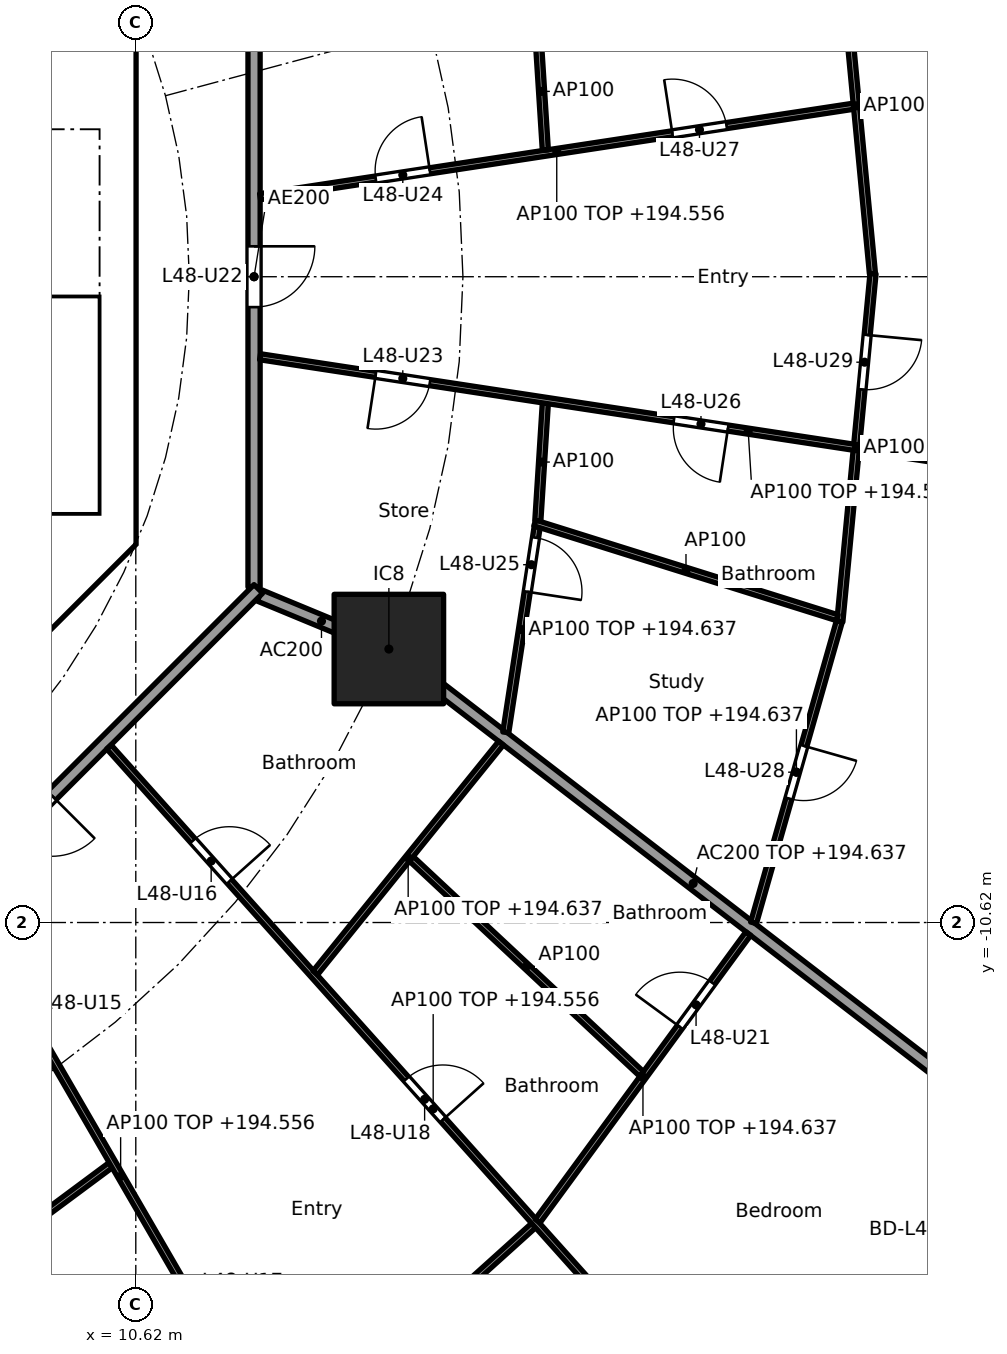
"""IFC4 building model, lengths in metres.
Left out: names, types, materials, properties, quantities, classifications, styles, units other than length and angle.
Written with IfcOpenShell. Run it as: python <this file> out.ifc"""

import sys

from ifc_helpers import new_model, si_unit, direction, frame, frame_2d, origin, origin_2d, place, context, subcontext, project, spatial, polyline, rectangle, outline, extrude, element, fill, save


model = new_model("IFC4")
c1 = context("Model", 3, precision=1e-05, world=origin(), true_north=direction((0.0, 1.0)))
c2 = subcontext(c1, "Body", "Model", "MODEL_VIEW")
j1 = project(units=[si_unit("LENGTHUNIT", "METRE"), si_unit("PLANEANGLEUNIT", "RADIAN")], contexts=[c1])
p1 = place(None, origin())
s1 = spatial("IfcSite", under=j1, at=p1, CompositionType="ELEMENT")
p2 = place(p1, origin())
s2 = spatial("IfcBuilding", under=s1, at=p2, CompositionType="ELEMENT")
p3 = place(p2, frame((0.0, 0.0, 191.8)))
s3 = spatial("IfcBuildingStorey", under=s2, at=p3, CompositionType="ELEMENT", Elevation=191.8)
p4 = place(p3, frame((14.782, -6.123, 0.0), z_axis=(0.0, 0.0, 1.0), x_axis=(1.0, 0.0, 0.0)))
e1 = element("IfcColumn", 1, at=p4, inside=s3, PredefinedType="COLUMN", context=c2, shape_type="SweptSolid", body=[
    extrude(rectangle(XDim=1.8, YDim=1.8, at=origin_2d()), origin(), (0.0, 0.0, 1.0), 3.7),
])
p5 = place(p3, frame((25.189, -14.848, 0.0), z_axis=(0.0, 0.0, 1.0), x_axis=(-0.506367803691, -0.862317602386, 0.0)))
e2 = element("IfcWall", 2, at=p5, inside=s3, PredefinedType="SOLIDWALL", context=c2, shape_type="SweptSolid", body=[
    extrude(rectangle(XDim=3.092, YDim=0.25, at=frame_2d((1.546, 0.0))), origin(), (0.0, 0.0, 1.0), 3.44),
])
p6 = place(p5, frame((0.496, 0.0, 0.0)))
e3 = element("IfcOpeningElement", 3, at=p6, cuts=e2, PredefinedType="OPENING", context=c2, shape_type="SweptSolid", body=[
    extrude(rectangle(XDim=2.1, YDim=2.4, at=frame_2d((1.05, 1.2))), frame((0.0, 0.135, 0.0), z_axis=(0.0, -1.0, 0.0), x_axis=(1.0, 0.0, 0.0)), (0.0, 0.0, 1.0), 0.27),
])
p7 = place(p3, frame((4.613, -9.988, 0.0), z_axis=(0.0, 0.0, 1.0), x_axis=(0.707106781187, 0.707106781187, 0.0)))
e4 = element("IfcWall", 4, at=p7, inside=s3, PredefinedType="SHEAR", context=c2, shape_type="SweptSolid", body=[
    extrude(rectangle(XDim=7.602, YDim=0.6, at=frame_2d((3.801, 0.0))), origin(), (0.0, 0.0, 1.0), 3.44),
])
p8 = place(p7, frame((3.201, 0.0, 0.0)))
e5 = element("IfcOpeningElement", 5, at=p8, cuts=e4, PredefinedType="OPENING", context=c2, shape_type="SweptSolid", body=[
    extrude(rectangle(XDim=1.2, YDim=2.1, at=frame_2d((0.6, 1.05))), frame((0.0, 0.31, 0.0), z_axis=(0.0, -1.0, 0.0), x_axis=(1.0, 0.0, 0.0)), (0.0, 0.0, 1.0), 0.62),
])
p9 = place(p3, origin())
e6 = element("IfcWall", 6, at=p9, inside=s3, PredefinedType="SHEAR", context=c2, shape_type="SweptSolid", body=[
    extrude(outline(polyline([(9.776, -4.401), (10.025, -4.152), (10.025, -3.801), (10.025, 4.152), (9.776, 4.401), (10.2, 4.825), (10.625, 4.401), (10.625, -4.401), (10.2, -4.825), (9.776, -4.401)])), origin(), (0.0, 0.0, 1.0), 3.44),
])
p10 = place(p3, origin())
e7 = element("IfcWall", 7, at=p10, inside=s3, PredefinedType="SOLIDWALL", context=c2, shape_type="SweptSolid", body=[
    extrude(outline(polyline([(10.025, -4.1), (6.7, -4.1), (6.7, -3.9), (10.025, -3.9), (10.025, -4.1)])), origin(), (0.0, 0.0, 1.0), 3.44),
])
p11 = place(p3, frame((6.138, -14.83, 0.0), z_axis=(0.0, 0.0, 1.0), x_axis=(0.294818517221, -0.955553264818, 0.0)))
e8 = element("IfcWall", 8, at=p11, inside=s3, PredefinedType="PARTITIONING", context=c2, shape_type="SweptSolid", body=[
    extrude(rectangle(XDim=12.619, YDim=0.2, at=frame_2d((6.31, 0.0))), origin(), (0.0, 0.0, 1.0), 2.837),
])
p12 = place(p3, frame((12.657, -5.243, 0.0), z_axis=(0.0, 0.0, 1.0), x_axis=(0.92383017907, -0.382802560388, 0.0)))
e9 = element("IfcWall", 9, at=p12, inside=s3, PredefinedType="PARTITIONING", context=c2, shape_type="SweptSolid", body=[
    extrude(rectangle(XDim=2.2, YDim=0.2, at=frame_2d((1.1, 0.0))), origin(), (0.0, 0.0, 1.0), 3.44),
])
p13 = place(p3, frame((14.822, -6.154, 0.0), z_axis=(0.0, 0.0, 1.0), x_axis=(0.792203056092, -0.610257583254, 0.0)))
e10 = element("IfcWall", 10, at=p13, inside=s3, PredefinedType="PARTITIONING", context=c2, shape_type="SweptSolid", body=[
    extrude(rectangle(XDim=12.533, YDim=0.2, at=frame_2d((6.266, 0.0))), origin(), (0.0, 0.0, 1.0), 2.837),
])
p14 = place(p3, frame((12.565, -5.104, 0.0), z_axis=(0.0, 0.0, 1.0), x_axis=(0.0, 1.0, 0.0)))
e11 = element("IfcWall", 11, at=p14, inside=s3, PredefinedType="PARTITIONING", context=c2, shape_type="SweptSolid", body=[
    extrude(rectangle(XDim=10.209, YDim=0.2, at=frame_2d((5.104, 0.0))), origin(), (0.0, 0.0, 1.0), 3.44),
])
p15 = place(p14, frame((4.604, 0.0, 0.0)))
e12 = element("IfcOpeningElement", 12, at=p15, cuts=e11, PredefinedType="OPENING", context=c2, shape_type="SweptSolid", body=[
    extrude(rectangle(XDim=1.0, YDim=2.1, at=frame_2d((0.5, 1.05))), frame((0.0, 0.11, 0.0), z_axis=(0.0, -1.0, 0.0), x_axis=(1.0, 0.0, 0.0)), (0.0, 0.0, 1.0), 0.22),
])
p16 = place(p3, frame((5.275, -12.494, 0.0), z_axis=(0.0, 0.0, 1.0), x_axis=(0.707106781187, 0.707106781187, 0.0)))
e13 = element("IfcWall", 13, at=p16, inside=s3, PredefinedType="PARTITIONING", context=c2, shape_type="SweptSolid", body=[
    extrude(rectangle(XDim=10.409, YDim=0.2, at=frame_2d((5.205, 0.0))), origin(), (0.0, 0.0, 1.0), 3.44),
])
p17 = place(p16, frame((4.604, 0.0, 0.0)))
e14 = element("IfcOpeningElement", 14, at=p17, cuts=e13, PredefinedType="OPENING", context=c2, shape_type="SweptSolid", body=[
    extrude(rectangle(XDim=1.0, YDim=2.1, at=frame_2d((0.5, 1.05))), frame((0.0, 0.11, 0.0), z_axis=(0.0, -1.0, 0.0), x_axis=(1.0, 0.0, 0.0)), (0.0, 0.0, 1.0), 0.22),
])
p18 = place(p3, frame((22.734, 0.05, 0.0), z_axis=(0.0, 0.0, 1.0), x_axis=(-0.094923312677, 0.995484587882, 0.0)))
e15 = element("IfcWall", 15, at=p18, inside=s3, PredefinedType="PARTITIONING", context=c2, shape_type="SweptSolid", body=[
    extrude(rectangle(XDim=5.548, YDim=0.1, at=frame_2d((2.774, 0.0))), origin(), (0.0, 0.0, 1.0), 2.837),
])
p19 = place(p3, frame((22.744, 0.05, 0.0), z_axis=(0.0, 0.0, 1.0), x_axis=(-0.094931362305, -0.995483820286, 0.0)))
e16 = element("IfcWall", 16, at=p19, inside=s3, PredefinedType="PARTITIONING", context=c2, shape_type="SweptSolid", body=[
    extrude(rectangle(XDim=5.748, YDim=0.1, at=frame_2d((2.874, 0.0))), origin(), (0.0, 0.0, 1.0), 2.837),
])
p20 = place(p19, frame((1.012, 0.0, 0.0)))
e17 = element("IfcOpeningElement", 17, at=p20, cuts=e16, PredefinedType="OPENING", context=c2, shape_type="SweptSolid", body=[
    extrude(rectangle(XDim=0.9, YDim=2.1, at=frame_2d((0.45, 1.05))), frame((0.0, 0.06, 0.0), z_axis=(0.0, -1.0, 0.0), x_axis=(1.0, 0.0, 0.0)), (0.0, 0.0, 1.0), 0.12),
])
p21 = place(p3, frame((12.664, 1.316, 0.0), z_axis=(0.0, 0.0, 1.0), x_axis=(0.988579217853, 0.150702123505, 0.0)))
e18 = element("IfcWall", 18, at=p21, inside=s3, PredefinedType="PARTITIONING", context=c2, shape_type="SweptSolid", body=[
    extrude(rectangle(XDim=9.871, YDim=0.1, at=frame_2d((4.936, 0.0))), origin(), (0.0, 0.0, 1.0), 2.756),
])
p22 = place(p21, frame((1.924, 0.0, 0.0)))
e19 = element("IfcOpeningElement", 19, at=p22, cuts=e18, PredefinedType="OPENING", context=c2, shape_type="SweptSolid", body=[
    extrude(rectangle(XDim=0.9, YDim=2.1, at=frame_2d((0.45, 1.05))), frame((0.0, 0.06, 0.0), z_axis=(0.0, -1.0, 0.0), x_axis=(1.0, 0.0, 0.0)), (0.0, 0.0, 1.0), 0.12),
])
p23 = place(p21, frame((6.86, 0.0, 0.0)))
e20 = element("IfcOpeningElement", 20, at=p23, cuts=e18, PredefinedType="OPENING", context=c2, shape_type="SweptSolid", body=[
    extrude(rectangle(XDim=0.9, YDim=2.1, at=frame_2d((0.45, 1.05))), frame((0.0, 0.06, 0.0), z_axis=(0.0, -1.0, 0.0), x_axis=(1.0, 0.0, 0.0)), (0.0, 0.0, 1.0), 0.12),
])
p24 = place(p3, frame((17.355, 2.082, 0.0), z_axis=(0.0, 0.0, 1.0), x_axis=(-0.063689464349, 0.997969765139, 0.0)))
e21 = element("IfcWall", 21, at=p24, inside=s3, PredefinedType="PARTITIONING", context=c2, shape_type="SweptSolid", body=[
    extrude(rectangle(XDim=1.936, YDim=0.1, at=frame_2d((0.968, 0.0))), origin(), (0.0, 0.0, 1.0), 3.44),
])
p25 = place(p3, frame((6.921, -17.05, 0.0), z_axis=(0.0, 0.0, 1.0), x_axis=(0.802769141821, 0.596289950394, 0.0)))
e22 = element("IfcWall", 22, at=p25, inside=s3, PredefinedType="PARTITIONING", context=c2, shape_type="SweptSolid", body=[
    extrude(rectangle(XDim=4.092, YDim=0.1, at=frame_2d((2.046, 0.0))), origin(), (0.0, 0.0, 1.0), 2.837),
])
p26 = place(p3, frame((7.708, -10.198, 0.0), z_axis=(0.0, 0.0, 1.0), x_axis=(0.501288100085, -0.865280440501, 0.0)))
e23 = element("IfcWall", 23, at=p26, inside=s3, PredefinedType="PARTITIONING", context=c2, shape_type="SweptSolid", body=[
    extrude(rectangle(XDim=10.623, YDim=0.1, at=frame_2d((5.312, 0.0))), origin(), (0.0, 0.0, 1.0), 2.756),
])
p27 = place(p26, frame((2.082, 0.0, 0.0)))
e24 = element("IfcOpeningElement", 24, at=p27, cuts=e23, PredefinedType="OPENING", context=c2, shape_type="SweptSolid", body=[
    extrude(rectangle(XDim=0.9, YDim=2.1, at=frame_2d((0.45, 1.05))), frame((0.0, 0.06, 0.0), z_axis=(0.0, -1.0, 0.0), x_axis=(1.0, 0.0, 0.0)), (0.0, 0.0, 1.0), 0.12),
])
p28 = place(p26, frame((7.369, 0.0, 0.0)))
e25 = element("IfcOpeningElement", 25, at=p28, cuts=e23, PredefinedType="OPENING", context=c2, shape_type="SweptSolid", body=[
    extrude(rectangle(XDim=0.9, YDim=2.1, at=frame_2d((0.45, 1.05))), frame((0.0, 0.06, 0.0), z_axis=(0.0, -1.0, 0.0), x_axis=(1.0, 0.0, 0.0)), (0.0, 0.0, 1.0), 0.12),
])
p29 = place(p3, frame((13.045, -19.313, 0.0), z_axis=(0.0, 0.0, 1.0), x_axis=(0.742790086539, 0.66952437397, 0.0)))
e26 = element("IfcWall", 26, at=p29, inside=s3, PredefinedType="PARTITIONING", context=c2, shape_type="SweptSolid", body=[
    extrude(rectangle(XDim=5.542, YDim=0.1, at=frame_2d((2.771, 0.0))), origin(), (0.0, 0.0, 1.0), 2.837),
])
p30 = place(p29, frame((2.321, 0.0, 0.0)))
e27 = element("IfcOpeningElement", 27, at=p30, cuts=e26, PredefinedType="OPENING", context=c2, shape_type="SweptSolid", body=[
    extrude(rectangle(XDim=0.9, YDim=2.1, at=frame_2d((0.45, 1.05))), frame((0.0, 0.06, 0.0), z_axis=(0.0, -1.0, 0.0), x_axis=(1.0, 0.0, 0.0)), (0.0, 0.0, 1.0), 0.12),
])
p31 = place(p3, frame((10.178, -7.732, 0.0), z_axis=(0.0, 0.0, 1.0), x_axis=(0.667283629999, -0.74480370376, 0.0)))
e28 = element("IfcWall", 28, at=p31, inside=s3, PredefinedType="PARTITIONING", context=c2, shape_type="SweptSolid", body=[
    extrude(rectangle(XDim=15.983, YDim=0.1, at=frame_2d((7.992, 0.0))), origin(), (0.0, 0.0, 1.0), 2.756),
])
p32 = place(p31, frame((2.07, 0.0, 0.0)))
e29 = element("IfcOpeningElement", 29, at=p32, cuts=e28, PredefinedType="OPENING", context=c2, shape_type="SweptSolid", body=[
    extrude(rectangle(XDim=0.9, YDim=2.1, at=frame_2d((0.45, 1.05))), frame((0.0, 0.06, 0.0), z_axis=(0.0, -1.0, 0.0), x_axis=(1.0, 0.0, 0.0)), (0.0, 0.0, 1.0), 0.12),
])
p33 = place(p31, frame((7.331, 0.0, 0.0)))
e30 = element("IfcOpeningElement", 30, at=p33, cuts=e28, PredefinedType="OPENING", context=c2, shape_type="SweptSolid", body=[
    extrude(rectangle(XDim=0.9, YDim=2.1, at=frame_2d((0.45, 1.05))), frame((0.0, 0.06, 0.0), z_axis=(0.0, -1.0, 0.0), x_axis=(1.0, 0.0, 0.0)), (0.0, 0.0, 1.0), 0.12),
])
p34 = place(p31, frame((12.802, 0.0, 0.0)))
e31 = element("IfcOpeningElement", 31, at=p34, cuts=e28, PredefinedType="OPENING", context=c2, shape_type="SweptSolid", body=[
    extrude(rectangle(XDim=0.9, YDim=2.1, at=frame_2d((0.45, 1.05))), frame((0.0, 0.06, 0.0), z_axis=(0.0, -1.0, 0.0), x_axis=(1.0, 0.0, 0.0)), (0.0, 0.0, 1.0), 0.12),
])
p35 = place(p3, frame((13.572, -11.447, 0.0), z_axis=(0.0, 0.0, 1.0), x_axis=(0.628738316533, 0.777616955399, 0.0)))
e32 = element("IfcWall", 32, at=p35, inside=s3, PredefinedType="PARTITIONING", context=c2, shape_type="SweptSolid", body=[
    extrude(rectangle(XDim=4.857, YDim=0.1, at=frame_2d((2.429, 0.0))), origin(), (0.0, 0.0, 1.0), 2.837),
])
p36 = place(p3, frame((17.229, -15.529, 0.0), z_axis=(0.0, 0.0, 1.0), x_axis=(0.591110768293, 0.806590391468, 0.0)))
e33 = element("IfcWall", 33, at=p36, inside=s3, PredefinedType="PARTITIONING", context=c2, shape_type="SweptSolid", body=[
    extrude(rectangle(XDim=5.86, YDim=0.1, at=frame_2d((2.93, 0.0))), origin(), (0.0, 0.0, 1.0), 2.837),
])
p37 = place(p36, frame((3.958, 0.0, 0.0)))
e34 = element("IfcOpeningElement", 34, at=p37, cuts=e33, PredefinedType="OPENING", context=c2, shape_type="SweptSolid", body=[
    extrude(rectangle(XDim=0.9, YDim=2.1, at=frame_2d((0.45, 1.05))), frame((0.0, 0.06, 0.0), z_axis=(0.0, -1.0, 0.0), x_axis=(1.0, 0.0, 0.0)), (0.0, 0.0, 1.0), 0.12),
])
p38 = place(p3, frame((15.152, -9.573, 0.0), z_axis=(0.0, 0.0, 1.0), x_axis=(0.730723083214, -0.682673989294, 0.0)))
e35 = element("IfcWall", 35, at=p38, inside=s3, PredefinedType="PARTITIONING", context=c2, shape_type="SweptSolid", body=[
    extrude(rectangle(XDim=5.183, YDim=0.1, at=frame_2d((2.591, 0.0))), origin(), (0.0, 0.0, 1.0), 3.44),
])
p39 = place(p3, frame((16.704, -7.493, 0.0), z_axis=(0.0, 0.0, 1.0), x_axis=(0.1510806336, 0.988521442434, 0.0)))
e36 = element("IfcWall", 36, at=p39, inside=s3, PredefinedType="PARTITIONING", context=c2, shape_type="SweptSolid", body=[
    extrude(rectangle(XDim=3.419, YDim=0.1, at=frame_2d((1.71, 0.0))), origin(), (0.0, 0.0, 1.0), 2.837),
])
p40 = place(p39, frame((2.339, 0.0, 0.0)))
e37 = element("IfcOpeningElement", 37, at=p40, cuts=e36, PredefinedType="OPENING", context=c2, shape_type="SweptSolid", body=[
    extrude(rectangle(XDim=0.9, YDim=2.1, at=frame_2d((0.45, 1.05))), frame((0.0, 0.06, 0.0), z_axis=(0.0, -1.0, 0.0), x_axis=(1.0, 0.0, 0.0)), (0.0, 0.0, 1.0), 0.12),
])
p41 = place(p3, frame((20.779, -10.625, 0.0), z_axis=(0.0, 0.0, 1.0), x_axis=(0.273819702124, 0.961781040949, 0.0)))
e38 = element("IfcWall", 38, at=p41, inside=s3, PredefinedType="PARTITIONING", context=c2, shape_type="SweptSolid", body=[
    extrude(rectangle(XDim=5.152, YDim=0.1, at=frame_2d((2.576, 0.0))), origin(), (0.0, 0.0, 1.0), 2.837),
])
p42 = place(p41, frame((2.126, 0.0, 0.0)))
e39 = element("IfcOpeningElement", 39, at=p42, cuts=e38, PredefinedType="OPENING", context=c2, shape_type="SweptSolid", body=[
    extrude(rectangle(XDim=0.9, YDim=2.1, at=frame_2d((0.45, 1.05))), frame((0.0, 0.06, 0.0), z_axis=(0.0, -1.0, 0.0), x_axis=(1.0, 0.0, 0.0)), (0.0, 0.0, 1.0), 0.12),
])
p43 = place(p3, frame((17.181, -4.049, 0.0), z_axis=(0.0, 0.0, 1.0), x_axis=(0.954246359918, -0.299021545351, 0.0)))
e40 = element("IfcWall", 40, at=p43, inside=s3, PredefinedType="PARTITIONING", context=c2, shape_type="SweptSolid", body=[
    extrude(rectangle(XDim=5.213, YDim=0.1, at=frame_2d((2.606, 0.0))), origin(), (0.0, 0.0, 1.0), 3.44),
])
p44 = place(p3, frame((17.232, -4.014, 0.0), z_axis=(0.0, 0.0, 1.0), x_axis=(0.063689464349, 0.997969765139, 0.0)))
e41 = element("IfcWall", 41, at=p44, inside=s3, PredefinedType="PARTITIONING", context=c2, shape_type="SweptSolid", body=[
    extrude(rectangle(XDim=1.936, YDim=0.1, at=frame_2d((0.968, 0.0))), origin(), (0.0, 0.0, 1.0), 3.44),
])
p45 = place(p3, frame((12.664, -1.316, 0.0), z_axis=(0.0, 0.0, 1.0), x_axis=(0.988585177081, -0.150663026836, 0.0)))
e42 = element("IfcWall", 42, at=p45, inside=s3, PredefinedType="PARTITIONING", context=c2, shape_type="SweptSolid", body=[
    extrude(rectangle(XDim=16.24, YDim=0.1, at=frame_2d((8.12, 0.0))), origin(), (0.0, 0.0, 1.0), 2.756),
])
p46 = place(p45, frame((1.924, 0.0, 0.0)))
e43 = element("IfcOpeningElement", 43, at=p46, cuts=e42, PredefinedType="OPENING", context=c2, shape_type="SweptSolid", body=[
    extrude(rectangle(XDim=0.9, YDim=2.1, at=frame_2d((0.45, 1.05))), frame((0.0, 0.06, 0.0), z_axis=(0.0, -1.0, 0.0), x_axis=(1.0, 0.0, 0.0)), (0.0, 0.0, 1.0), 0.12),
])
p47 = place(p45, frame((6.885, 0.0, 0.0)))
e44 = element("IfcOpeningElement", 44, at=p47, cuts=e42, PredefinedType="OPENING", context=c2, shape_type="SweptSolid", body=[
    extrude(rectangle(XDim=0.9, YDim=2.1, at=frame_2d((0.45, 1.05))), frame((0.0, 0.06, 0.0), z_axis=(0.0, -1.0, 0.0), x_axis=(1.0, 0.0, 0.0)), (0.0, 0.0, 1.0), 0.12),
])
p48 = place(p17, frame((1.0, 0.0, 0.0), x_axis=(-1.0, 0.0, 0.0)))
e45 = element("IfcDoor", 45, at=p48, inside=s3, OperationType="SINGLE_SWING_LEFT", PredefinedType="DOOR", context=c2, shape_type="SweptSolid", body=[
    extrude(rectangle(XDim=1.0, YDim=2.1, at=frame_2d((0.5, 1.05))), frame((0.0, 0.025, 0.0), z_axis=(0.0, -1.0, 0.0), x_axis=(1.0, 0.0, 0.0)), (0.0, 0.0, 1.0), 0.05),
])
fill(e14, e45)
p49 = place(p32, origin())
e46 = element("IfcDoor", 46, at=p49, inside=s3, OperationType="SINGLE_SWING_RIGHT", PredefinedType="DOOR", context=c2, shape_type="SweptSolid", body=[
    extrude(rectangle(XDim=0.9, YDim=2.1, at=frame_2d((0.45, 1.05))), frame((0.0, 0.025, 0.0), z_axis=(0.0, -1.0, 0.0), x_axis=(1.0, 0.0, 0.0)), (0.0, 0.0, 1.0), 0.05),
])
fill(e29, e46)
p50 = place(p33, origin())
e47 = element("IfcDoor", 47, at=p50, inside=s3, OperationType="SINGLE_SWING_RIGHT", PredefinedType="DOOR", context=c2, shape_type="SweptSolid", body=[
    extrude(rectangle(XDim=0.9, YDim=2.1, at=frame_2d((0.45, 1.05))), frame((0.0, 0.025, 0.0), z_axis=(0.0, -1.0, 0.0), x_axis=(1.0, 0.0, 0.0)), (0.0, 0.0, 1.0), 0.05),
])
fill(e30, e47)
p51 = place(p37, origin())
e48 = element("IfcDoor", 48, at=p51, inside=s3, OperationType="SINGLE_SWING_LEFT", PredefinedType="DOOR", context=c2, shape_type="SweptSolid", body=[
    extrude(rectangle(XDim=0.9, YDim=2.1, at=frame_2d((0.45, 1.05))), frame((0.0, 0.025, 0.0), z_axis=(0.0, -1.0, 0.0), x_axis=(1.0, 0.0, 0.0)), (0.0, 0.0, 1.0), 0.05),
])
fill(e34, e48)
p52 = place(p15, frame((1.0, 0.0, 0.0), x_axis=(-1.0, 0.0, 0.0)))
e49 = element("IfcDoor", 49, at=p52, inside=s3, OperationType="SINGLE_SWING_LEFT", PredefinedType="DOOR", context=c2, shape_type="SweptSolid", body=[
    extrude(rectangle(XDim=1.0, YDim=2.1, at=frame_2d((0.5, 1.05))), frame((0.0, 0.025, 0.0), z_axis=(0.0, -1.0, 0.0), x_axis=(1.0, 0.0, 0.0)), (0.0, 0.0, 1.0), 0.05),
])
fill(e12, e49)
p53 = place(p46, frame((0.9, 0.0, 0.0), x_axis=(-1.0, 0.0, 0.0)))
e50 = element("IfcDoor", 50, at=p53, inside=s3, OperationType="SINGLE_SWING_RIGHT", PredefinedType="DOOR", context=c2, shape_type="SweptSolid", body=[
    extrude(rectangle(XDim=0.9, YDim=2.1, at=frame_2d((0.45, 1.05))), frame((0.0, 0.025, 0.0), z_axis=(0.0, -1.0, 0.0), x_axis=(1.0, 0.0, 0.0)), (0.0, 0.0, 1.0), 0.05),
])
fill(e43, e50)
p54 = place(p22, origin())
e51 = element("IfcDoor", 51, at=p54, inside=s3, OperationType="SINGLE_SWING_RIGHT", PredefinedType="DOOR", context=c2, shape_type="SweptSolid", body=[
    extrude(rectangle(XDim=0.9, YDim=2.1, at=frame_2d((0.45, 1.05))), frame((0.0, 0.025, 0.0), z_axis=(0.0, -1.0, 0.0), x_axis=(1.0, 0.0, 0.0)), (0.0, 0.0, 1.0), 0.05),
])
fill(e19, e51)
p55 = place(p40, frame((0.9, 0.0, 0.0), x_axis=(-1.0, 0.0, 0.0)))
e52 = element("IfcDoor", 52, at=p55, inside=s3, OperationType="SINGLE_SWING_RIGHT", PredefinedType="DOOR", context=c2, shape_type="SweptSolid", body=[
    extrude(rectangle(XDim=0.9, YDim=2.1, at=frame_2d((0.45, 1.05))), frame((0.0, 0.025, 0.0), z_axis=(0.0, -1.0, 0.0), x_axis=(1.0, 0.0, 0.0)), (0.0, 0.0, 1.0), 0.05),
])
fill(e37, e52)
p56 = place(p47, frame((0.9, 0.0, 0.0), x_axis=(-1.0, 0.0, 0.0)))
e53 = element("IfcDoor", 53, at=p56, inside=s3, OperationType="SINGLE_SWING_LEFT", PredefinedType="DOOR", context=c2, shape_type="SweptSolid", body=[
    extrude(rectangle(XDim=0.9, YDim=2.1, at=frame_2d((0.45, 1.05))), frame((0.0, 0.025, 0.0), z_axis=(0.0, -1.0, 0.0), x_axis=(1.0, 0.0, 0.0)), (0.0, 0.0, 1.0), 0.05),
])
fill(e44, e53)
p57 = place(p23, origin())
e54 = element("IfcDoor", 54, at=p57, inside=s3, OperationType="SINGLE_SWING_LEFT", PredefinedType="DOOR", context=c2, shape_type="SweptSolid", body=[
    extrude(rectangle(XDim=0.9, YDim=2.1, at=frame_2d((0.45, 1.05))), frame((0.0, 0.025, 0.0), z_axis=(0.0, -1.0, 0.0), x_axis=(1.0, 0.0, 0.0)), (0.0, 0.0, 1.0), 0.05),
])
fill(e20, e54)
p58 = place(p42, frame((0.9, 0.0, 0.0), x_axis=(-1.0, 0.0, 0.0)))
e55 = element("IfcDoor", 55, at=p58, inside=s3, OperationType="SINGLE_SWING_LEFT", PredefinedType="DOOR", context=c2, shape_type="SweptSolid", body=[
    extrude(rectangle(XDim=0.9, YDim=2.1, at=frame_2d((0.45, 1.05))), frame((0.0, 0.025, 0.0), z_axis=(0.0, -1.0, 0.0), x_axis=(1.0, 0.0, 0.0)), (0.0, 0.0, 1.0), 0.05),
])
fill(e39, e55)
p59 = place(p20, origin())
e56 = element("IfcDoor", 56, at=p59, inside=s3, OperationType="SINGLE_SWING_LEFT", PredefinedType="DOOR", context=c2, shape_type="SweptSolid", body=[
    extrude(rectangle(XDim=0.9, YDim=2.1, at=frame_2d((0.45, 1.05))), frame((0.0, 0.025, 0.0), z_axis=(0.0, -1.0, 0.0), x_axis=(1.0, 0.0, 0.0)), (0.0, 0.0, 1.0), 0.05),
])
fill(e17, e56)
save(model, sys.argv[1])
